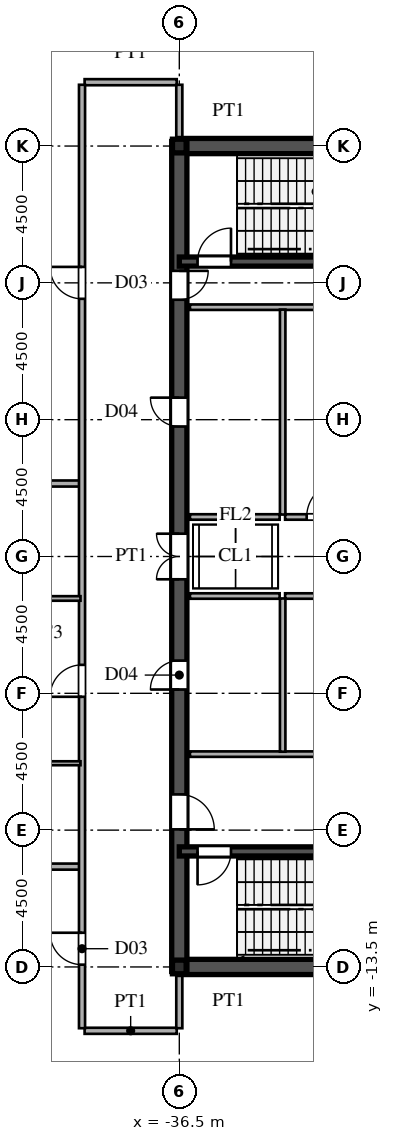
"""IFC4 building model, lengths in metres.
Left out: names, types, materials, properties, quantities, classifications, styles, units other than length and angle.
Written with IfcOpenShell. Run it as: python <this file> out.ifc"""

import sys

from ifc_helpers import new_model, si_unit, direction, frame, frame_2d, origin, origin_2d, place, context, subcontext, project, spatial, rectangle, i_section, extrude, source, transform, mapped, element, fill, save


model = new_model("IFC4")
c1 = context("Model", 3, precision=1e-05, world=origin(), true_north=direction((0.0, 1.0)))
c2 = subcontext(c1, "Body", "Model", "MODEL_VIEW")
j1 = project(units=[si_unit("LENGTHUNIT", "METRE"), si_unit("PLANEANGLEUNIT", "RADIAN")], contexts=[c1])
p1 = place(None, origin())
s1 = spatial("IfcSite", under=j1, at=p1, CompositionType="ELEMENT")
p2 = place(p1, origin())
s2 = spatial("IfcBuilding", under=s1, at=p2, CompositionType="ELEMENT")
p3 = place(p2, frame((0.0, 0.0, 250.65)))
s3 = spatial("IfcBuildingStorey", under=s2, at=p3, CompositionType="ELEMENT", Elevation=250.65)
m1 = source(origin(), c2, "Body", "SweptSolid", [
    extrude(i_section(OverallWidth=0.45, OverallDepth=0.45, WebThickness=0.016, FlangeThickness=0.025, at=origin_2d()), origin(), (0.0, 0.0, 1.0), 3.75),
])
for number, where, z_axis, x_axis in (
    (1, (-36.5, -13.5, 0.0), (0.0, 0.0, 1.0), (1.0, 0.0, 0.0)),
    (2, (-36.5, 13.5, 0.0), (0.0, 0.0, 1.0), (1.0, 0.0, 0.0)),
):
    element("IfcColumn", number, at=place(p3, frame(where, z_axis=z_axis, x_axis=x_axis)), inside=s3, PredefinedType="COLUMN", context=c2, shape_type="MappedRepresentation", body=[
        mapped(m1, transform((0.0, 0.0, 0.0), scale=1.0)),
    ])
for number, where, z_axis, x_axis in (
    (3, (-36.5, -13.5, 0.0), (0.0, 0.0, 1.0), (1.0, 0.0, 0.0)),
    (4, (-36.5, 13.5, 0.0), (0.0, 0.0, 1.0), (1.0, 0.0, 0.0)),
):
    element("IfcWall", number, at=place(p3, frame(where, z_axis=z_axis, x_axis=x_axis)), inside=s3, PredefinedType="SHEAR", context=c2, shape_type="SweptSolid", body=[
        extrude(rectangle(XDim=9.0, YDim=0.5, at=frame_2d((4.5, 0.0))), origin(), (0.0, 0.0, 1.0), 3.53),
    ])
p4 = place(p3, frame((-36.5, -13.65, 0.0), z_axis=(0.0, 0.0, 1.0), x_axis=(0.0, 1.0, 0.0)))
e5 = element("IfcWall", 5, at=p4, inside=s3, PredefinedType="SHEAR", context=c2, shape_type="SweptSolid", body=[
    extrude(rectangle(XDim=7.15, YDim=0.5, at=frame_2d((3.575, 0.0))), origin(), (0.0, 0.0, 1.0), 3.53),
])
p5 = place(p4, frame((4.675, 0.0, 0.0)))
e6 = element("IfcOpeningElement", 6, at=p5, cuts=e5, PredefinedType="OPENING", context=c2, shape_type="SweptSolid", body=[
    extrude(rectangle(XDim=1.15, YDim=2.2, at=frame_2d((0.575, 1.1))), frame((0.0, 0.26, 0.0), z_axis=(0.0, -1.0, 0.0), x_axis=(1.0, 0.0, 0.0)), (0.0, 0.0, 1.0), 0.52),
])
p6 = place(p3, frame((-36.5, -1.3, 0.0), z_axis=(0.0, 0.0, 1.0), x_axis=(0.0, 1.0, 0.0)))
e7 = element("IfcWall", 7, at=p6, inside=s3, PredefinedType="SHEAR", context=c2, shape_type="SweptSolid", body=[
    extrude(rectangle(XDim=2.6, YDim=0.5, at=frame_2d((1.3, 0.0))), origin(), (0.0, 0.0, 1.0), 3.53),
])
p7 = place(p6, frame((0.55, 0.0, 0.0)))
e8 = element("IfcOpeningElement", 8, at=p7, cuts=e7, PredefinedType="OPENING", context=c2, shape_type="SweptSolid", body=[
    extrude(rectangle(XDim=1.5, YDim=2.3, at=frame_2d((0.75, 1.15))), frame((0.0, 0.26, 0.0), z_axis=(0.0, -1.0, 0.0), x_axis=(1.0, 0.0, 0.0)), (0.0, 0.0, 1.0), 0.52),
])
p8 = place(p3, frame((-36.5, 8.2, 0.0), z_axis=(0.0, 0.0, 1.0), x_axis=(0.0, 1.0, 0.0)))
e9 = element("IfcWall", 9, at=p8, inside=s3, PredefinedType="SHEAR", context=c2, shape_type="SweptSolid", body=[
    extrude(rectangle(XDim=5.45, YDim=0.5, at=frame_2d((2.725, 0.0))), origin(), (0.0, 0.0, 1.0), 3.53),
])
p9 = place(p8, frame((0.245, 0.0, 0.0)))
e10 = element("IfcOpeningElement", 10, at=p9, cuts=e9, PredefinedType="OPENING", context=c2, shape_type="SweptSolid", body=[
    extrude(rectangle(XDim=0.95, YDim=2.15, at=frame_2d((0.475, 1.075))), frame((0.0, 0.26, 0.0), z_axis=(0.0, -1.0, 0.0), x_axis=(1.0, 0.0, 0.0)), (0.0, 0.0, 1.0), 0.52),
])
p10 = place(p3, frame((-36.5, -6.5, 0.0), z_axis=(0.0, 0.0, 1.0), x_axis=(0.0, 1.0, 0.0)))
e11 = element("IfcWall", 11, at=p10, inside=s3, PredefinedType="SHEAR", context=c2, shape_type="SweptSolid", body=[
    extrude(rectangle(XDim=5.2, YDim=0.5, at=frame_2d((2.6, 0.0))), origin(), (0.0, 0.0, 1.0), 3.53),
])
p11 = place(p10, frame((2.125, 0.0, 0.0)))
e12 = element("IfcOpeningElement", 12, at=p11, cuts=e11, PredefinedType="OPENING", context=c2, shape_type="SweptSolid", body=[
    extrude(rectangle(XDim=0.95, YDim=2.15, at=frame_2d((0.475, 1.075))), frame((0.0, 0.26, 0.0), z_axis=(0.0, -1.0, 0.0), x_axis=(1.0, 0.0, 0.0)), (0.0, 0.0, 1.0), 0.52),
])
p12 = place(p3, frame((-36.5, 1.3, 0.0), z_axis=(0.0, 0.0, 1.0), x_axis=(0.0, 1.0, 0.0)))
e13 = element("IfcWall", 13, at=p12, inside=s3, PredefinedType="SHEAR", context=c2, shape_type="SweptSolid", body=[
    extrude(rectangle(XDim=6.9, YDim=0.5, at=frame_2d((3.45, 0.0))), origin(), (0.0, 0.0, 1.0), 3.53),
])
p13 = place(p12, frame((2.975, 0.0, 0.0)))
e14 = element("IfcOpeningElement", 14, at=p13, cuts=e13, PredefinedType="OPENING", context=c2, shape_type="SweptSolid", body=[
    extrude(rectangle(XDim=0.95, YDim=2.15, at=frame_2d((0.475, 1.075))), frame((0.0, 0.26, 0.0), z_axis=(0.0, -1.0, 0.0), x_axis=(1.0, 0.0, 0.0)), (0.0, 0.0, 1.0), 0.52),
])
p14 = place(p3, frame((-36.5, -9.7, 0.0), z_axis=(0.0, 0.0, 1.0), x_axis=(1.0, 0.0, 0.0)))
e15 = element("IfcWall", 15, at=p14, inside=s3, PredefinedType="SHEAR", context=c2, shape_type="SweptSolid", body=[
    extrude(rectangle(XDim=9.0, YDim=0.3, at=frame_2d((4.5, 0.0))), origin(), (0.0, 0.0, 1.0), 3.53),
])
p15 = place(p14, frame((0.6, 0.0, 0.0)))
e16 = element("IfcOpeningElement", 16, at=p15, cuts=e15, PredefinedType="OPENING", context=c2, shape_type="SweptSolid", body=[
    extrude(rectangle(XDim=1.1, YDim=2.2, at=frame_2d((0.55, 1.1))), frame((0.0, 0.16, 0.0), z_axis=(0.0, -1.0, 0.0), x_axis=(1.0, 0.0, 0.0)), (0.0, 0.0, 1.0), 0.32),
])
p16 = place(p3, frame((-36.5, 9.7, 0.0), z_axis=(0.0, 0.0, 1.0), x_axis=(1.0, 0.0, 0.0)))
e17 = element("IfcWall", 17, at=p16, inside=s3, PredefinedType="SHEAR", context=c2, shape_type="SweptSolid", body=[
    extrude(rectangle(XDim=9.0, YDim=0.3, at=frame_2d((4.5, 0.0))), origin(), (0.0, 0.0, 1.0), 3.53),
])
p17 = place(p16, frame((0.6, 0.0, 0.0)))
e18 = element("IfcOpeningElement", 18, at=p17, cuts=e17, PredefinedType="OPENING", context=c2, shape_type="SweptSolid", body=[
    extrude(rectangle(XDim=1.1, YDim=2.2, at=frame_2d((0.55, 1.1))), frame((0.0, 0.16, 0.0), z_axis=(0.0, -1.0, 0.0), x_axis=(1.0, 0.0, 0.0)), (0.0, 0.0, 1.0), 0.32),
])
for number, where, z_axis, x_axis in (
    (19, (-36.15, -6.5, 0.0), (0.0, 0.0, 1.0), (1.0, 0.0, 0.0)),
    (20, (-36.15, 8.2, 0.0), (0.0, 0.0, 1.0), (1.0, 0.0, 0.0)),
):
    element("IfcWall", number, at=place(p3, frame(where, z_axis=z_axis, x_axis=x_axis)), inside=s3, PredefinedType="PARTITIONING", context=c2, shape_type="SweptSolid", body=[
        extrude(rectangle(XDim=5.7, YDim=0.18, at=frame_2d((2.85, 0.0))), origin(), (0.0, 0.0, 1.0), 3.53),
    ])
p18 = place(p3, frame((-33.1, -6.42, 0.0), z_axis=(0.0, 0.0, 1.0), x_axis=(0.0, 1.0, 0.0)))
e21 = element("IfcWall", 21, at=p18, inside=s3, PredefinedType="PARTITIONING", context=c2, shape_type="SweptSolid", body=[
    extrude(rectangle(XDim=5.04, YDim=0.18, at=frame_2d((2.52, 0.0))), origin(), (0.0, 0.0, 1.0), 3.53),
])
p19 = place(p3, frame((-33.1, 1.38, 0.0), z_axis=(0.0, 0.0, 1.0), x_axis=(0.0, 1.0, 0.0)))
e22 = element("IfcWall", 22, at=p19, inside=s3, PredefinedType="PARTITIONING", context=c2, shape_type="SweptSolid", body=[
    extrude(rectangle(XDim=6.74, YDim=0.18, at=frame_2d((3.37, 0.0))), origin(), (0.0, 0.0, 1.0), 3.53),
])
p20 = place(p3, frame((-33.02, -1.3, 0.0), z_axis=(0.0, 0.0, 1.0), x_axis=(1.0, 0.0, 0.0)))
e23 = element("IfcWall", 23, at=p20, inside=s3, PredefinedType="PARTITIONING", context=c2, shape_type="SweptSolid", body=[
    extrude(rectangle(XDim=5.17, YDim=0.18, at=frame_2d((2.585, 0.0))), origin(), (0.0, 0.0, 1.0), 3.53),
])
p21 = place(p20, frame((2.01, 0.0, 0.0)))
e24 = element("IfcOpeningElement", 24, at=p21, cuts=e23, PredefinedType="OPENING", context=c2, shape_type="SweptSolid", body=[
    extrude(rectangle(XDim=1.15, YDim=2.2, at=frame_2d((0.575, 1.1))), frame((0.0, 0.1, 0.0), z_axis=(0.0, -1.0, 0.0), x_axis=(1.0, 0.0, 0.0)), (0.0, 0.0, 1.0), 0.2),
])
p22 = place(p3, frame((-33.02, 1.3, 0.0), z_axis=(0.0, 0.0, 1.0), x_axis=(1.0, 0.0, 0.0)))
e25 = element("IfcWall", 25, at=p22, inside=s3, PredefinedType="PARTITIONING", context=c2, shape_type="SweptSolid", body=[
    extrude(rectangle(XDim=2.57, YDim=0.18, at=frame_2d((1.285, 0.0))), origin(), (0.0, 0.0, 1.0), 3.53),
])
p23 = place(p22, frame((0.71, 0.0, 0.0)))
e26 = element("IfcOpeningElement", 26, at=p23, cuts=e25, PredefinedType="OPENING", context=c2, shape_type="SweptSolid", body=[
    extrude(rectangle(XDim=1.15, YDim=2.2, at=frame_2d((0.575, 1.1))), frame((0.0, 0.1, 0.0), z_axis=(0.0, -1.0, 0.0), x_axis=(1.0, 0.0, 0.0)), (0.0, 0.0, 1.0), 0.2),
])
for number, where, z_axis, x_axis in (
    (27, (-36.15, -1.3, 0.0), (0.0, 0.0, 1.0), (1.0, 0.0, 0.0)),
    (28, (-36.15, 1.3, 0.0), (0.0, 0.0, 1.0), (1.0, 0.0, 0.0)),
):
    element("IfcWall", number, at=place(p3, frame(where, z_axis=z_axis, x_axis=x_axis)), inside=s3, PredefinedType="PARTITIONING", context=c2, shape_type="SweptSolid", body=[
        extrude(rectangle(XDim=2.95, YDim=0.18, at=frame_2d((1.475, 0.0))), origin(), (0.0, 0.0, 1.0), 3.53),
    ])
p24 = place(p3, frame((-39.615, -15.6, 0.0), z_axis=(0.0, 0.0, 1.0), x_axis=(1.0, 0.0, 0.0)))
e29 = element("IfcWall", 29, at=p24, inside=s3, PredefinedType="PARTITIONING", context=c2, shape_type="SweptSolid", body=[
    extrude(rectangle(XDim=3.03, YDim=0.2, at=frame_2d((1.515, 0.0))), origin(), (0.0, 0.0, 1.0), 3.53),
])
p25 = place(p3, frame((-53.01, -10.2, 0.0), z_axis=(0.0, 0.0, 1.0), x_axis=(1.0, 0.0, 0.0)))
e30 = element("IfcWall", 30, at=p25, inside=s3, PredefinedType="PARTITIONING", context=c2, shape_type="SweptSolid", body=[
    extrude(rectangle(XDim=13.23, YDim=0.2, at=frame_2d((6.615, 0.0))), origin(), (0.0, 0.0, 1.0), 3.53),
])
p26 = place(p3, frame((-44.25, -6.8, 0.0), z_axis=(0.0, 0.0, 1.0), x_axis=(1.0, 0.0, 0.0)))
e31 = element("IfcWall", 31, at=p26, inside=s3, PredefinedType="PARTITIONING", context=c2, shape_type="SweptSolid", body=[
    extrude(rectangle(XDim=4.5, YDim=0.13, at=frame_2d((2.25, 0.0))), origin(), (0.0, 0.0, 1.0), 3.53),
])
p27 = place(p26, frame((1.81, 0.0, 0.0)))
e32 = element("IfcOpeningElement", 32, at=p27, cuts=e31, PredefinedType="OPENING", context=c2, shape_type="SweptSolid", body=[
    extrude(rectangle(XDim=0.88, YDim=2.1, at=frame_2d((0.44, 1.05))), frame((0.0, 0.075, 0.0), z_axis=(0.0, -1.0, 0.0), x_axis=(1.0, 0.0, 0.0)), (0.0, 0.0, 1.0), 0.15),
])
p28 = place(p3, frame((-44.25, -1.38, 0.0), z_axis=(0.0, 0.0, 1.0), x_axis=(1.0, 0.0, 0.0)))
e33 = element("IfcWall", 33, at=p28, inside=s3, PredefinedType="PARTITIONING", context=c2, shape_type="SweptSolid", body=[
    extrude(rectangle(XDim=4.5, YDim=0.15, at=frame_2d((2.25, 0.0))), origin(), (0.0, 0.0, 1.0), 3.53),
])
p29 = place(p28, frame((1.775, 0.0, 0.0)))
e34 = element("IfcOpeningElement", 34, at=p29, cuts=e33, PredefinedType="OPENING", context=c2, shape_type="SweptSolid", body=[
    extrude(rectangle(XDim=0.95, YDim=2.15, at=frame_2d((0.475, 1.075))), frame((0.0, 0.085, 0.0), z_axis=(0.0, -1.0, 0.0), x_axis=(1.0, 0.0, 0.0)), (0.0, 0.0, 1.0), 0.17),
])
p30 = place(p3, frame((-66.01, 2.4, 0.0), z_axis=(0.0, 0.0, 1.0), x_axis=(1.0, 0.0, 0.0)))
e35 = element("IfcWall", 35, at=p30, inside=s3, PredefinedType="PARTITIONING", context=c2, shape_type="SweptSolid", body=[
    extrude(rectangle(XDim=26.23, YDim=0.2, at=frame_2d((13.115, 0.0))), origin(), (0.0, 0.0, 1.0), 3.53),
])
p31 = place(p3, frame((-39.615, 15.6, 0.0), z_axis=(0.0, 0.0, 1.0), x_axis=(1.0, 0.0, 0.0)))
e36 = element("IfcWall", 36, at=p31, inside=s3, PredefinedType="PARTITIONING", context=c2, shape_type="SweptSolid", body=[
    extrude(rectangle(XDim=3.03, YDim=0.2, at=frame_2d((1.515, 0.0))), origin(), (0.0, 0.0, 1.0), 3.53),
])
p32 = place(p3, frame((-39.7, -15.515, 0.0), z_axis=(0.0, 0.0, 1.0), x_axis=(0.0, 1.0, 0.0)))
e37 = element("IfcWall", 37, at=p32, inside=s3, PredefinedType="PARTITIONING", context=c2, shape_type="SweptSolid", body=[
    extrude(rectangle(XDim=31.03, YDim=0.2, at=frame_2d((15.515, 0.0))), origin(), (0.0, 0.0, 1.0), 3.53),
])
p33 = place(p32, frame((2.09, 0.0, 0.0)))
e38 = element("IfcOpeningElement", 38, at=p33, cuts=e37, PredefinedType="OPENING", context=c2, shape_type="SweptSolid", body=[
    extrude(rectangle(XDim=1.05, YDim=2.25, at=frame_2d((0.525, 1.125))), frame((0.0, 0.11, 0.0), z_axis=(0.0, -1.0, 0.0), x_axis=(1.0, 0.0, 0.0)), (0.0, 0.0, 1.0), 0.22),
])
p34 = place(p32, frame((10.901, 0.0, 0.0)))
e39 = element("IfcOpeningElement", 39, at=p34, cuts=e37, PredefinedType="OPENING", context=c2, shape_type="SweptSolid", body=[
    extrude(rectangle(XDim=1.05, YDim=2.25, at=frame_2d((0.525, 1.125))), frame((0.0, 0.11, 0.0), z_axis=(0.0, -1.0, 0.0), x_axis=(1.0, 0.0, 0.0)), (0.0, 0.0, 1.0), 0.22),
])
p35 = place(p32, frame((23.99, 0.0, 0.0)))
e40 = element("IfcOpeningElement", 40, at=p35, cuts=e37, PredefinedType="OPENING", context=c2, shape_type="SweptSolid", body=[
    extrude(rectangle(XDim=1.05, YDim=2.25, at=frame_2d((0.525, 1.125))), frame((0.0, 0.11, 0.0), z_axis=(0.0, -1.0, 0.0), x_axis=(1.0, 0.0, 0.0)), (0.0, 0.0, 1.0), 0.22),
])
for number, where, z_axis, x_axis in (
    (41, (-36.5, -15.515, 0.0), (0.0, 0.0, 1.0), (0.0, 1.0, 0.0)),
    (42, (-36.5, 13.755, 0.0), (0.0, 0.0, 1.0), (0.0, 1.0, 0.0)),
):
    element("IfcWall", number, at=place(p3, frame(where, z_axis=z_axis, x_axis=x_axis)), inside=s3, PredefinedType="PARTITIONING", context=c2, shape_type="SweptSolid", body=[
        extrude(rectangle(XDim=1.76, YDim=0.2, at=frame_2d((0.88, 0.0))), origin(), (0.0, 0.0, 1.0), 2.93),
    ])
m2 = source(origin(), c2, "Body", "SweptSolid", [
    extrude(rectangle(XDim=1.15, YDim=2.2, at=frame_2d((0.575, 1.1))), frame((0.0, 0.025, 0.0), z_axis=(0.0, -1.0, 0.0), x_axis=(1.0, 0.0, 0.0)), (0.0, 0.0, 1.0), 0.05),
])
p36 = place(p5, frame((1.15, 0.0, 0.0), z_axis=(0.0, 0.0, 1.0), x_axis=(-1.0, 0.0, 0.0)))
e43 = element("IfcDoor", 43, at=p36, inside=s3, OperationType="SINGLE_SWING_LEFT", PredefinedType="DOOR", context=c2, shape_type="MappedRepresentation", body=[
    mapped(m2, transform((0.0, 0.0, 0.0), scale=1.0)),
])
fill(e6, e43)
m3 = source(origin(), c2, "Body", "SweptSolid", [
    extrude(rectangle(XDim=1.5, YDim=2.3, at=frame_2d((0.75, 1.15))), frame((0.0, 0.025, 0.0), z_axis=(0.0, -1.0, 0.0), x_axis=(1.0, 0.0, 0.0)), (0.0, 0.0, 1.0), 0.05),
])
p37 = place(p7, origin())
e44 = element("IfcDoor", 44, at=p37, inside=s3, OperationType="DOUBLE_SWING_LEFT", PredefinedType="DOOR", context=c2, shape_type="MappedRepresentation", body=[
    mapped(m3, transform((0.0, 0.0, 0.0), scale=1.0)),
])
fill(e8, e44)
m4 = source(origin(), c2, "Body", "SweptSolid", [
    extrude(rectangle(XDim=0.95, YDim=2.15, at=frame_2d((0.475, 1.075))), frame((0.0, 0.025, 0.0), z_axis=(0.0, -1.0, 0.0), x_axis=(1.0, 0.0, 0.0)), (0.0, 0.0, 1.0), 0.05),
])
p38 = place(p9, frame((0.95, 0.0, 0.0), z_axis=(0.0, 0.0, 1.0), x_axis=(-1.0, 0.0, 0.0)))
e45 = element("IfcDoor", 45, at=p38, inside=s3, OperationType="SINGLE_SWING_RIGHT", PredefinedType="DOOR", context=c2, shape_type="MappedRepresentation", body=[
    mapped(m4, transform((0.0, 0.0, 0.0), scale=1.0)),
])
fill(e10, e45)
p39 = place(p11, origin())
e46 = element("IfcDoor", 46, at=p39, inside=s3, OperationType="SINGLE_SWING_LEFT", PredefinedType="DOOR", context=c2, shape_type="MappedRepresentation", body=[
    mapped(m4, transform((0.0, 0.0, 0.0), scale=1.0)),
])
fill(e12, e46)
p40 = place(p13, origin())
e47 = element("IfcDoor", 47, at=p40, inside=s3, OperationType="SINGLE_SWING_RIGHT", PredefinedType="DOOR", context=c2, shape_type="MappedRepresentation", body=[
    mapped(m4, transform((0.0, 0.0, 0.0), scale=1.0)),
])
fill(e14, e47)
m5 = source(origin(), c2, "Body", "SweptSolid", [
    extrude(rectangle(XDim=1.1, YDim=2.2, at=frame_2d((0.55, 1.1))), frame((0.0, 0.025, 0.0), z_axis=(0.0, -1.0, 0.0), x_axis=(1.0, 0.0, 0.0)), (0.0, 0.0, 1.0), 0.05),
])
p41 = place(p15, frame((1.1, 0.0, 0.0), z_axis=(0.0, 0.0, 1.0), x_axis=(-1.0, 0.0, 0.0)))
e48 = element("IfcDoor", 48, at=p41, inside=s3, OperationType="SINGLE_SWING_LEFT", PredefinedType="DOOR", context=c2, shape_type="MappedRepresentation", body=[
    mapped(m5, transform((0.0, 0.0, 0.0), scale=1.0)),
])
fill(e16, e48)
p42 = place(p17, origin())
e49 = element("IfcDoor", 49, at=p42, inside=s3, OperationType="SINGLE_SWING_RIGHT", PredefinedType="DOOR", context=c2, shape_type="MappedRepresentation", body=[
    mapped(m5, transform((0.0, 0.0, 0.0), scale=1.0)),
])
fill(e18, e49)
p43 = place(p23, origin())
e50 = element("IfcDoor", 50, at=p43, inside=s3, OperationType="SINGLE_SWING_RIGHT", PredefinedType="DOOR", context=c2, shape_type="MappedRepresentation", body=[
    mapped(m2, transform((0.0, 0.0, 0.0), scale=1.0)),
])
fill(e26, e50)
m6 = source(origin(), c2, "Body", "SweptSolid", [
    extrude(rectangle(XDim=1.05, YDim=2.25, at=frame_2d((0.525, 1.125))), frame((0.0, 0.025, 0.0), z_axis=(0.0, -1.0, 0.0), x_axis=(1.0, 0.0, 0.0)), (0.0, 0.0, 1.0), 0.05),
])
p44 = place(p33, origin())
e51 = element("IfcDoor", 51, at=p44, inside=s3, OperationType="SINGLE_SWING_RIGHT", PredefinedType="DOOR", context=c2, shape_type="MappedRepresentation", body=[
    mapped(m6, transform((0.0, 0.0, 0.0), scale=1.0)),
])
fill(e38, e51)
p45 = place(p34, origin())
e52 = element("IfcDoor", 52, at=p45, inside=s3, OperationType="SINGLE_SWING_LEFT", PredefinedType="DOOR", context=c2, shape_type="MappedRepresentation", body=[
    mapped(m6, transform((0.0, 0.0, 0.0), scale=1.0)),
])
fill(e39, e52)
p46 = place(p35, origin())
e53 = element("IfcDoor", 53, at=p46, inside=s3, OperationType="SINGLE_SWING_RIGHT", PredefinedType="DOOR", context=c2, shape_type="MappedRepresentation", body=[
    mapped(m6, transform((0.0, 0.0, 0.0), scale=1.0)),
])
fill(e40, e53)
save(model, sys.argv[1])
